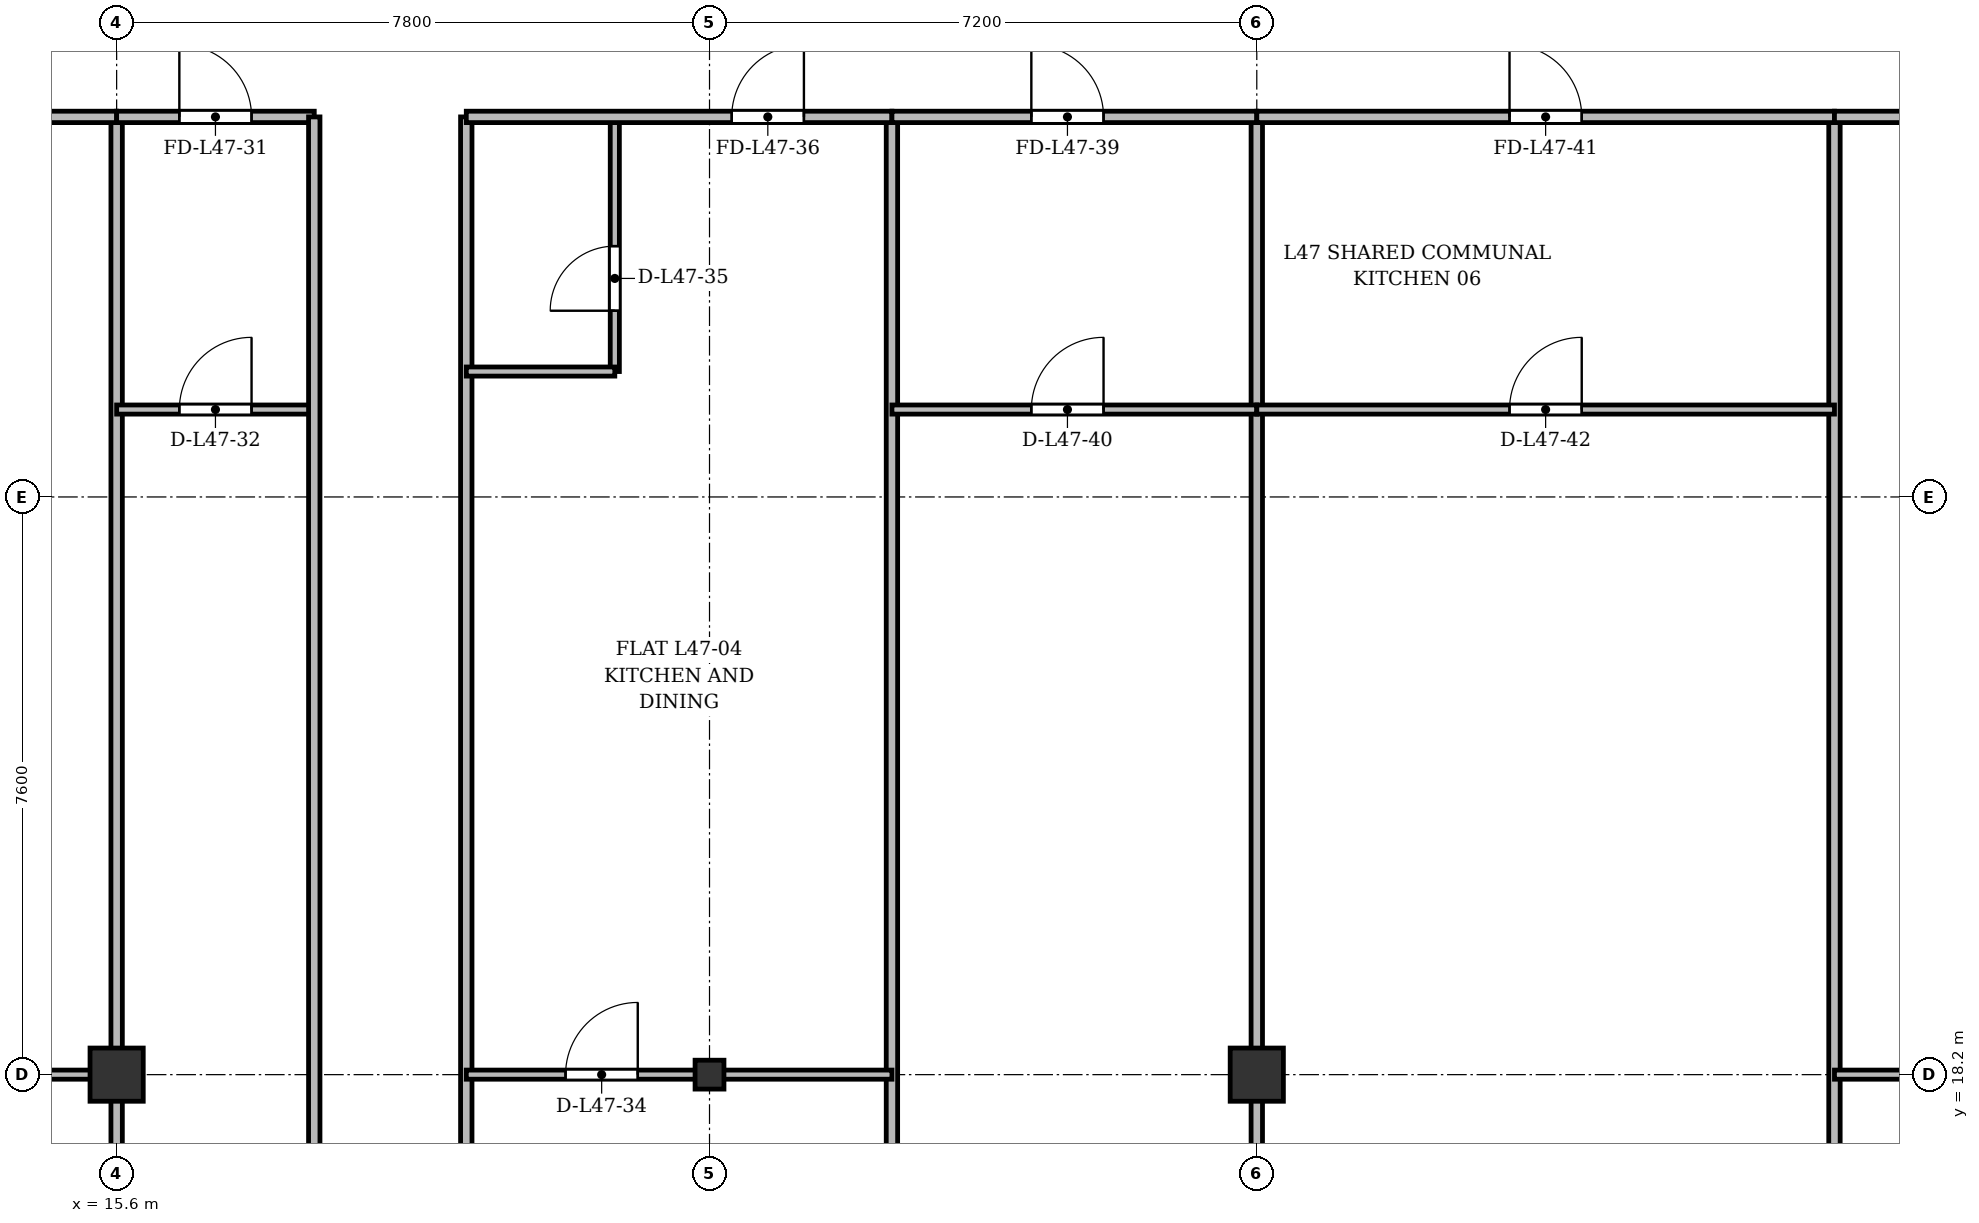
"""IFC4 building model, lengths in metres.
Left out: names, types, materials, properties, quantities, classifications, styles, units other than length and angle.
Written with IfcOpenShell. Run it as: python <this file> out.ifc"""

import sys

from ifc_helpers import new_model, si_unit, direction, frame, frame_2d, origin, origin_2d, place, context, subcontext, project, spatial, rectangle, i_section, extrude, source, transform, mapped, element, fill, save


model = new_model("IFC4")
c1 = context("Model", 3, precision=1e-05, world=origin(), true_north=direction((0.0, 1.0)))
c2 = subcontext(c1, "Body", "Model", "MODEL_VIEW")
j1 = project(units=[si_unit("LENGTHUNIT", "METRE"), si_unit("PLANEANGLEUNIT", "RADIAN")], contexts=[c1])
p1 = place(None, origin())
s1 = spatial("IfcSite", under=j1, at=p1, CompositionType="ELEMENT")
p2 = place(p1, origin())
s2 = spatial("IfcBuilding", under=s1, at=p2, CompositionType="ELEMENT")
p3 = place(p2, frame((0.0, 0.0, 178.9)))
s3 = spatial("IfcBuildingStorey", under=s2, at=p3, CompositionType="ELEMENT", Elevation=178.9)
m1 = source(origin(), c2, "Body", "SweptSolid", [
    extrude(rectangle(XDim=0.7, YDim=0.7, at=origin_2d()), origin(), (0.0, 0.0, 1.0), 3.6),
])
p4 = place(p3, frame((15.6, 18.2, 0.0), z_axis=(0.0, 0.0, 1.0), x_axis=(1.0, 0.0, 0.0)))
e1 = element("IfcColumn", 1, at=p4, inside=s3, PredefinedType="COLUMN", context=c2, shape_type="MappedRepresentation", body=[
    mapped(m1, transform((0.0, 0.0, 0.0), x_axis=(1.0, 0.0, 0.0), y_axis=(0.0, 1.0, 0.0), z_axis=(0.0, 0.0, 1.0), scale=1.0)),
])
m2 = source(origin(), c2, "Body", "SweptSolid", [
    extrude(i_section(OverallWidth=0.38, OverallDepth=0.38, WebThickness=0.02, FlangeThickness=0.03, at=origin_2d()), origin(), (0.0, 0.0, 1.0), 3.6),
])
p5 = place(p3, frame((23.4, 18.2, 0.0), z_axis=(0.0, 0.0, 1.0), x_axis=(1.0, 0.0, 0.0)))
e2 = element("IfcColumn", 2, at=p5, inside=s3, PredefinedType="COLUMN", context=c2, shape_type="MappedRepresentation", body=[
    mapped(m2, transform((0.0, 0.0, 0.0), x_axis=(1.0, 0.0, 0.0), y_axis=(0.0, 1.0, 0.0), z_axis=(0.0, 0.0, 1.0), scale=1.0)),
])
p6 = place(p3, frame((30.6, 18.2, 0.0), z_axis=(0.0, 0.0, 1.0), x_axis=(1.0, 0.0, 0.0)))
e3 = element("IfcColumn", 3, at=p6, inside=s3, PredefinedType="COLUMN", context=c2, shape_type="MappedRepresentation", body=[
    mapped(m1, transform((0.0, 0.0, 0.0), x_axis=(1.0, 0.0, 0.0), y_axis=(0.0, 1.0, 0.0), z_axis=(0.0, 0.0, 1.0), scale=1.0)),
])
p7 = place(p3, frame((15.6, 3.525, 0.0), z_axis=(0.0, 0.0, 1.0), x_axis=(0.0, 1.0, 0.0)))
e4 = element("IfcWall", 4, at=p7, inside=s3, PredefinedType="PARTITIONING", context=c2, shape_type="SweptSolid", body=[
    extrude(rectangle(XDim=27.275, YDim=0.15, at=frame_2d((13.638, 0.0))), origin(), (0.0, 0.0, 1.0), 2.72),
])
p8 = place(p3, frame((25.8, 6.81, 0.0), z_axis=(0.0, 0.0, 1.0), x_axis=(0.0, 1.0, 0.0)))
e5 = element("IfcWall", 5, at=p8, inside=s3, PredefinedType="PARTITIONING", context=c2, shape_type="SweptSolid", body=[
    extrude(rectangle(XDim=23.99, YDim=0.15, at=frame_2d((11.995, 0.0))), origin(), (0.0, 0.0, 1.0), 2.62),
])
p9 = place(p3, frame((30.6, 3.525, 0.0), z_axis=(0.0, 0.0, 1.0), x_axis=(0.0, 1.0, 0.0)))
e6 = element("IfcWall", 6, at=p9, inside=s3, PredefinedType="PARTITIONING", context=c2, shape_type="SweptSolid", body=[
    extrude(rectangle(XDim=27.275, YDim=0.15, at=frame_2d((13.638, 0.0))), origin(), (0.0, 0.0, 1.0), 2.72),
])
p10 = place(p3, frame((38.2, 3.525, 0.0), z_axis=(0.0, 0.0, 1.0), x_axis=(0.0, 1.0, 0.0)))
e7 = element("IfcWall", 7, at=p10, inside=s3, PredefinedType="PARTITIONING", context=c2, shape_type="SweptSolid", body=[
    extrude(rectangle(XDim=27.275, YDim=0.15, at=frame_2d((13.638, 0.0))), origin(), (0.0, 0.0, 1.0), 2.62),
])
p11 = place(p3, frame((8.04, 18.2, 0.0), z_axis=(0.0, 0.0, 1.0), x_axis=(1.0, 0.0, 0.0)))
e8 = element("IfcWall", 8, at=p11, inside=s3, PredefinedType="PARTITIONING", context=c2, shape_type="SweptSolid", body=[
    extrude(rectangle(XDim=7.56, YDim=0.12, at=frame_2d((3.78, 0.0))), origin(), (0.0, 0.0, 1.0), 2.62),
])
p12 = place(p11, frame((3.305, 0.0, 0.0)))
e9 = element("IfcOpeningElement", 9, at=p12, cuts=e8, PredefinedType="OPENING", context=c2, shape_type="SweptSolid", body=[
    extrude(rectangle(XDim=0.95, YDim=2.15, at=frame_2d((0.475, 1.075))), frame((0.0, 0.07, 0.0), z_axis=(0.0, -1.0, 0.0), x_axis=(1.0, 0.0, 0.0)), (0.0, 0.0, 1.0), 0.14),
])
p13 = place(p3, frame((8.025, 30.8, 0.0), z_axis=(0.0, 0.0, 1.0), x_axis=(1.0, 0.0, 0.0)))
e10 = element("IfcWall", 10, at=p13, inside=s3, PredefinedType="PARTITIONING", context=c2, shape_type="SweptSolid", body=[
    extrude(rectangle(XDim=7.575, YDim=0.15, at=frame_2d((3.788, 0.0))), origin(), (0.0, 0.0, 1.0), 2.72),
])
p14 = place(p13, frame((5.073, 0.0, 0.0)))
e11 = element("IfcOpeningElement", 11, at=p14, cuts=e10, PredefinedType="OPENING", context=c2, shape_type="SweptSolid", body=[
    extrude(rectangle(XDim=0.95, YDim=2.15, at=frame_2d((0.475, 1.075))), frame((0.0, 0.085, 0.0), z_axis=(0.0, -1.0, 0.0), x_axis=(1.0, 0.0, 0.0)), (0.0, 0.0, 1.0), 0.17),
])
p15 = place(p3, frame((15.6, 30.8, 0.0), z_axis=(0.0, 0.0, 1.0), x_axis=(1.0, 0.0, 0.0)))
e12 = element("IfcWall", 12, at=p15, inside=s3, PredefinedType="PARTITIONING", context=c2, shape_type="SweptSolid", body=[
    extrude(rectangle(XDim=2.6, YDim=0.15, at=frame_2d((1.3, 0.0))), origin(), (0.0, 0.0, 1.0), 2.72),
])
p16 = place(p15, frame((0.825, 0.0, 0.0)))
e13 = element("IfcOpeningElement", 13, at=p16, cuts=e12, PredefinedType="OPENING", context=c2, shape_type="SweptSolid", body=[
    extrude(rectangle(XDim=0.95, YDim=2.15, at=frame_2d((0.475, 1.075))), frame((0.0, 0.085, 0.0), z_axis=(0.0, -1.0, 0.0), x_axis=(1.0, 0.0, 0.0)), (0.0, 0.0, 1.0), 0.17),
])
p17 = place(p3, frame((15.6, 26.95, 0.0), z_axis=(0.0, 0.0, 1.0), x_axis=(1.0, 0.0, 0.0)))
e14 = element("IfcWall", 14, at=p17, inside=s3, PredefinedType="PARTITIONING", context=c2, shape_type="SweptSolid", body=[
    extrude(rectangle(XDim=2.6, YDim=0.12, at=frame_2d((1.3, 0.0))), origin(), (0.0, 0.0, 1.0), 2.72),
])
p18 = place(p17, frame((0.825, 0.0, 0.0)))
e15 = element("IfcOpeningElement", 15, at=p18, cuts=e14, PredefinedType="OPENING", context=c2, shape_type="SweptSolid", body=[
    extrude(rectangle(XDim=0.95, YDim=2.15, at=frame_2d((0.475, 1.075))), frame((0.0, 0.07, 0.0), z_axis=(0.0, -1.0, 0.0), x_axis=(1.0, 0.0, 0.0)), (0.0, 0.0, 1.0), 0.14),
])
for number, where, z_axis, x_axis in (
    (16, (18.2, 6.81, 0.0), (0.0, 0.0, 1.0), (0.0, 1.0, 0.0)),
    (17, (20.2, 6.81, 0.0), (0.0, 0.0, 1.0), (0.0, 1.0, 0.0)),
):
    element("IfcWall", number, at=place(p3, frame(where, z_axis=z_axis, x_axis=x_axis)), inside=s3, PredefinedType="PARTITIONING", context=c2, shape_type="SweptSolid", body=[
        extrude(rectangle(XDim=23.99, YDim=0.15, at=frame_2d((11.995, 0.0))), origin(), (0.0, 0.0, 1.0), 2.62),
    ])
p19 = place(p3, frame((20.2, 18.2, 0.0), z_axis=(0.0, 0.0, 1.0), x_axis=(1.0, 0.0, 0.0)))
e18 = element("IfcWall", 18, at=p19, inside=s3, PredefinedType="PARTITIONING", context=c2, shape_type="SweptSolid", body=[
    extrude(rectangle(XDim=5.6, YDim=0.12, at=frame_2d((2.8, 0.0))), origin(), (0.0, 0.0, 1.0), 2.62),
])
p20 = place(p19, frame((1.306, 0.0, 0.0)))
e19 = element("IfcOpeningElement", 19, at=p20, cuts=e18, PredefinedType="OPENING", context=c2, shape_type="SweptSolid", body=[
    extrude(rectangle(XDim=0.95, YDim=2.15, at=frame_2d((0.475, 1.075))), frame((0.0, 0.07, 0.0), z_axis=(0.0, -1.0, 0.0), x_axis=(1.0, 0.0, 0.0)), (0.0, 0.0, 1.0), 0.14),
])
p21 = place(p3, frame((22.154, 27.45, 0.0), z_axis=(0.0, 0.0, 1.0), x_axis=(0.0, 1.0, 0.0)))
e20 = element("IfcWall", 20, at=p21, inside=s3, PredefinedType="PARTITIONING", context=c2, shape_type="SweptSolid", body=[
    extrude(rectangle(XDim=3.35, YDim=0.12, at=frame_2d((1.675, 0.0))), origin(), (0.0, 0.0, 1.0), 3.22),
])
p22 = place(p21, frame((0.8, 0.0, 0.0)))
e21 = element("IfcOpeningElement", 21, at=p22, cuts=e20, PredefinedType="OPENING", context=c2, shape_type="SweptSolid", body=[
    extrude(rectangle(XDim=0.85, YDim=2.1, at=frame_2d((0.425, 1.05))), frame((0.0, 0.07, 0.0), z_axis=(0.0, -1.0, 0.0), x_axis=(1.0, 0.0, 0.0)), (0.0, 0.0, 1.0), 0.14),
])
p23 = place(p3, frame((20.2, 27.45, 0.0), z_axis=(0.0, 0.0, 1.0), x_axis=(1.0, 0.0, 0.0)))
e22 = element("IfcWall", 22, at=p23, inside=s3, PredefinedType="PARTITIONING", context=c2, shape_type="SweptSolid", body=[
    extrude(rectangle(XDim=1.954, YDim=0.12, at=frame_2d((0.977, 0.0))), origin(), (0.0, 0.0, 1.0), 3.22),
])
p24 = place(p3, frame((20.2, 30.8, 0.0), z_axis=(0.0, 0.0, 1.0), x_axis=(1.0, 0.0, 0.0)))
e23 = element("IfcWall", 23, at=p24, inside=s3, PredefinedType="PARTITIONING", context=c2, shape_type="SweptSolid", body=[
    extrude(rectangle(XDim=5.6, YDim=0.15, at=frame_2d((2.8, 0.0))), origin(), (0.0, 0.0, 1.0), 2.72),
])
p25 = place(p24, frame((3.492, 0.0, 0.0)))
e24 = element("IfcOpeningElement", 24, at=p25, cuts=e23, PredefinedType="OPENING", context=c2, shape_type="SweptSolid", body=[
    extrude(rectangle(XDim=0.95, YDim=2.15, at=frame_2d((0.475, 1.075))), frame((0.0, 0.085, 0.0), z_axis=(0.0, -1.0, 0.0), x_axis=(1.0, 0.0, 0.0)), (0.0, 0.0, 1.0), 0.17),
])
p26 = place(p3, frame((25.8, 30.8, 0.0), z_axis=(0.0, 0.0, 1.0), x_axis=(1.0, 0.0, 0.0)))
e25 = element("IfcWall", 25, at=p26, inside=s3, PredefinedType="PARTITIONING", context=c2, shape_type="SweptSolid", body=[
    extrude(rectangle(XDim=4.8, YDim=0.15, at=frame_2d((2.4, 0.0))), origin(), (0.0, 0.0, 1.0), 2.72),
])
p27 = place(p26, frame((1.834, 0.0, 0.0)))
e26 = element("IfcOpeningElement", 26, at=p27, cuts=e25, PredefinedType="OPENING", context=c2, shape_type="SweptSolid", body=[
    extrude(rectangle(XDim=0.95, YDim=2.15, at=frame_2d((0.475, 1.075))), frame((0.0, 0.085, 0.0), z_axis=(0.0, -1.0, 0.0), x_axis=(1.0, 0.0, 0.0)), (0.0, 0.0, 1.0), 0.17),
])
p28 = place(p3, frame((25.8, 26.95, 0.0), z_axis=(0.0, 0.0, 1.0), x_axis=(1.0, 0.0, 0.0)))
e27 = element("IfcWall", 27, at=p28, inside=s3, PredefinedType="PARTITIONING", context=c2, shape_type="SweptSolid", body=[
    extrude(rectangle(XDim=4.8, YDim=0.12, at=frame_2d((2.4, 0.0))), origin(), (0.0, 0.0, 1.0), 2.72),
])
p29 = place(p28, frame((1.834, 0.0, 0.0)))
e28 = element("IfcOpeningElement", 28, at=p29, cuts=e27, PredefinedType="OPENING", context=c2, shape_type="SweptSolid", body=[
    extrude(rectangle(XDim=0.95, YDim=2.15, at=frame_2d((0.475, 1.075))), frame((0.0, 0.07, 0.0), z_axis=(0.0, -1.0, 0.0), x_axis=(1.0, 0.0, 0.0)), (0.0, 0.0, 1.0), 0.14),
])
p30 = place(p3, frame((30.6, 30.8, 0.0), z_axis=(0.0, 0.0, 1.0), x_axis=(1.0, 0.0, 0.0)))
e29 = element("IfcWall", 29, at=p30, inside=s3, PredefinedType="PARTITIONING", context=c2, shape_type="SweptSolid", body=[
    extrude(rectangle(XDim=7.6, YDim=0.15, at=frame_2d((3.8, 0.0))), origin(), (0.0, 0.0, 1.0), 2.72),
])
p31 = place(p30, frame((3.325, 0.0, 0.0)))
e30 = element("IfcOpeningElement", 30, at=p31, cuts=e29, PredefinedType="OPENING", context=c2, shape_type="SweptSolid", body=[
    extrude(rectangle(XDim=0.95, YDim=2.15, at=frame_2d((0.475, 1.075))), frame((0.0, 0.085, 0.0), z_axis=(0.0, -1.0, 0.0), x_axis=(1.0, 0.0, 0.0)), (0.0, 0.0, 1.0), 0.17),
])
p32 = place(p3, frame((30.6, 26.95, 0.0), z_axis=(0.0, 0.0, 1.0), x_axis=(1.0, 0.0, 0.0)))
e31 = element("IfcWall", 31, at=p32, inside=s3, PredefinedType="PARTITIONING", context=c2, shape_type="SweptSolid", body=[
    extrude(rectangle(XDim=7.6, YDim=0.12, at=frame_2d((3.8, 0.0))), origin(), (0.0, 0.0, 1.0), 2.72),
])
p33 = place(p32, frame((3.325, 0.0, 0.0)))
e32 = element("IfcOpeningElement", 32, at=p33, cuts=e31, PredefinedType="OPENING", context=c2, shape_type="SweptSolid", body=[
    extrude(rectangle(XDim=0.95, YDim=2.15, at=frame_2d((0.475, 1.075))), frame((0.0, 0.07, 0.0), z_axis=(0.0, -1.0, 0.0), x_axis=(1.0, 0.0, 0.0)), (0.0, 0.0, 1.0), 0.14),
])
p34 = place(p3, frame((38.2, 30.8, 0.0), z_axis=(0.0, 0.0, 1.0), x_axis=(1.0, 0.0, 0.0)))
e33 = element("IfcWall", 33, at=p34, inside=s3, PredefinedType="PARTITIONING", context=c2, shape_type="SweptSolid", body=[
    extrude(rectangle(XDim=5.6, YDim=0.15, at=frame_2d((2.8, 0.0))), origin(), (0.0, 0.0, 1.0), 2.72),
])
p35 = place(p34, frame((2.232, 0.0, 0.0)))
e34 = element("IfcOpeningElement", 34, at=p35, cuts=e33, PredefinedType="OPENING", context=c2, shape_type="SweptSolid", body=[
    extrude(rectangle(XDim=0.95, YDim=2.15, at=frame_2d((0.475, 1.075))), frame((0.0, 0.085, 0.0), z_axis=(0.0, -1.0, 0.0), x_axis=(1.0, 0.0, 0.0)), (0.0, 0.0, 1.0), 0.17),
])
p36 = place(p3, frame((38.2, 18.2, 0.0), z_axis=(0.0, 0.0, 1.0), x_axis=(1.0, 0.0, 0.0)))
e35 = element("IfcWall", 35, at=p36, inside=s3, PredefinedType="PARTITIONING", context=c2, shape_type="SweptSolid", body=[
    extrude(rectangle(XDim=5.6, YDim=0.12, at=frame_2d((2.8, 0.0))), origin(), (0.0, 0.0, 1.0), 2.62),
])
p37 = place(p36, frame((2.232, 0.0, 0.0)))
e36 = element("IfcOpeningElement", 36, at=p37, cuts=e35, PredefinedType="OPENING", context=c2, shape_type="SweptSolid", body=[
    extrude(rectangle(XDim=0.95, YDim=2.15, at=frame_2d((0.475, 1.075))), frame((0.0, 0.07, 0.0), z_axis=(0.0, -1.0, 0.0), x_axis=(1.0, 0.0, 0.0)), (0.0, 0.0, 1.0), 0.14),
])
m3 = source(origin(), c2, "Body", "SweptSolid", [
    extrude(rectangle(XDim=0.95, YDim=2.15, at=frame_2d((0.475, 1.075))), frame((0.0, 0.025, 0.0), z_axis=(0.0, -1.0, 0.0), x_axis=(1.0, 0.0, 0.0)), (0.0, 0.0, 1.0), 0.05),
])
p38 = place(p16, origin())
e37 = element("IfcDoor", 37, at=p38, inside=s3, OperationType="SINGLE_SWING_LEFT", PredefinedType="DOOR", context=c2, shape_type="MappedRepresentation", body=[
    mapped(m3, transform((0.0, 0.0, 0.0), x_axis=(1.0, 0.0, 0.0), y_axis=(0.0, 1.0, 0.0), z_axis=(0.0, 0.0, 1.0), scale=1.0)),
])
fill(e13, e37)
p39 = place(p18, origin())
e38 = element("IfcDoor", 38, at=p39, inside=s3, OperationType="SINGLE_SWING_RIGHT", PredefinedType="DOOR", context=c2, shape_type="MappedRepresentation", body=[
    mapped(m3, transform((0.0, 0.0, 0.0), x_axis=(1.0, 0.0, 0.0), y_axis=(0.0, 1.0, 0.0), z_axis=(0.0, 0.0, 1.0), scale=1.0)),
])
fill(e15, e38)
p40 = place(p20, origin())
e39 = element("IfcDoor", 39, at=p40, inside=s3, OperationType="SINGLE_SWING_RIGHT", PredefinedType="DOOR", context=c2, shape_type="MappedRepresentation", body=[
    mapped(m3, transform((0.0, 0.0, 0.0), x_axis=(1.0, 0.0, 0.0), y_axis=(0.0, 1.0, 0.0), z_axis=(0.0, 0.0, 1.0), scale=1.0)),
])
fill(e19, e39)
m4 = source(origin(), c2, "Body", "SweptSolid", [
    extrude(rectangle(XDim=0.85, YDim=2.1, at=frame_2d((0.425, 1.05))), frame((0.0, 0.025, 0.0), z_axis=(0.0, -1.0, 0.0), x_axis=(1.0, 0.0, 0.0)), (0.0, 0.0, 1.0), 0.05),
])
p41 = place(p22, origin())
e40 = element("IfcDoor", 40, at=p41, inside=s3, OperationType="SINGLE_SWING_LEFT", PredefinedType="DOOR", context=c2, shape_type="MappedRepresentation", body=[
    mapped(m4, transform((0.0, 0.0, 0.0), x_axis=(1.0, 0.0, 0.0), y_axis=(0.0, 1.0, 0.0), z_axis=(0.0, 0.0, 1.0), scale=1.0)),
])
fill(e21, e40)
p42 = place(p25, origin())
e41 = element("IfcDoor", 41, at=p42, inside=s3, OperationType="SINGLE_SWING_RIGHT", PredefinedType="DOOR", context=c2, shape_type="MappedRepresentation", body=[
    mapped(m3, transform((0.0, 0.0, 0.0), x_axis=(1.0, 0.0, 0.0), y_axis=(0.0, 1.0, 0.0), z_axis=(0.0, 0.0, 1.0), scale=1.0)),
])
fill(e24, e41)
p43 = place(p27, origin())
e42 = element("IfcDoor", 42, at=p43, inside=s3, OperationType="SINGLE_SWING_LEFT", PredefinedType="DOOR", context=c2, shape_type="MappedRepresentation", body=[
    mapped(m3, transform((0.0, 0.0, 0.0), x_axis=(1.0, 0.0, 0.0), y_axis=(0.0, 1.0, 0.0), z_axis=(0.0, 0.0, 1.0), scale=1.0)),
])
fill(e26, e42)
p44 = place(p29, origin())
e43 = element("IfcDoor", 43, at=p44, inside=s3, OperationType="SINGLE_SWING_RIGHT", PredefinedType="DOOR", context=c2, shape_type="MappedRepresentation", body=[
    mapped(m3, transform((0.0, 0.0, 0.0), x_axis=(1.0, 0.0, 0.0), y_axis=(0.0, 1.0, 0.0), z_axis=(0.0, 0.0, 1.0), scale=1.0)),
])
fill(e28, e43)
p45 = place(p31, origin())
e44 = element("IfcDoor", 44, at=p45, inside=s3, OperationType="SINGLE_SWING_LEFT", PredefinedType="DOOR", context=c2, shape_type="MappedRepresentation", body=[
    mapped(m3, transform((0.0, 0.0, 0.0), x_axis=(1.0, 0.0, 0.0), y_axis=(0.0, 1.0, 0.0), z_axis=(0.0, 0.0, 1.0), scale=1.0)),
])
fill(e30, e44)
p46 = place(p33, origin())
e45 = element("IfcDoor", 45, at=p46, inside=s3, OperationType="SINGLE_SWING_RIGHT", PredefinedType="DOOR", context=c2, shape_type="MappedRepresentation", body=[
    mapped(m3, transform((0.0, 0.0, 0.0), x_axis=(1.0, 0.0, 0.0), y_axis=(0.0, 1.0, 0.0), z_axis=(0.0, 0.0, 1.0), scale=1.0)),
])
fill(e32, e45)
save(model, sys.argv[1])
